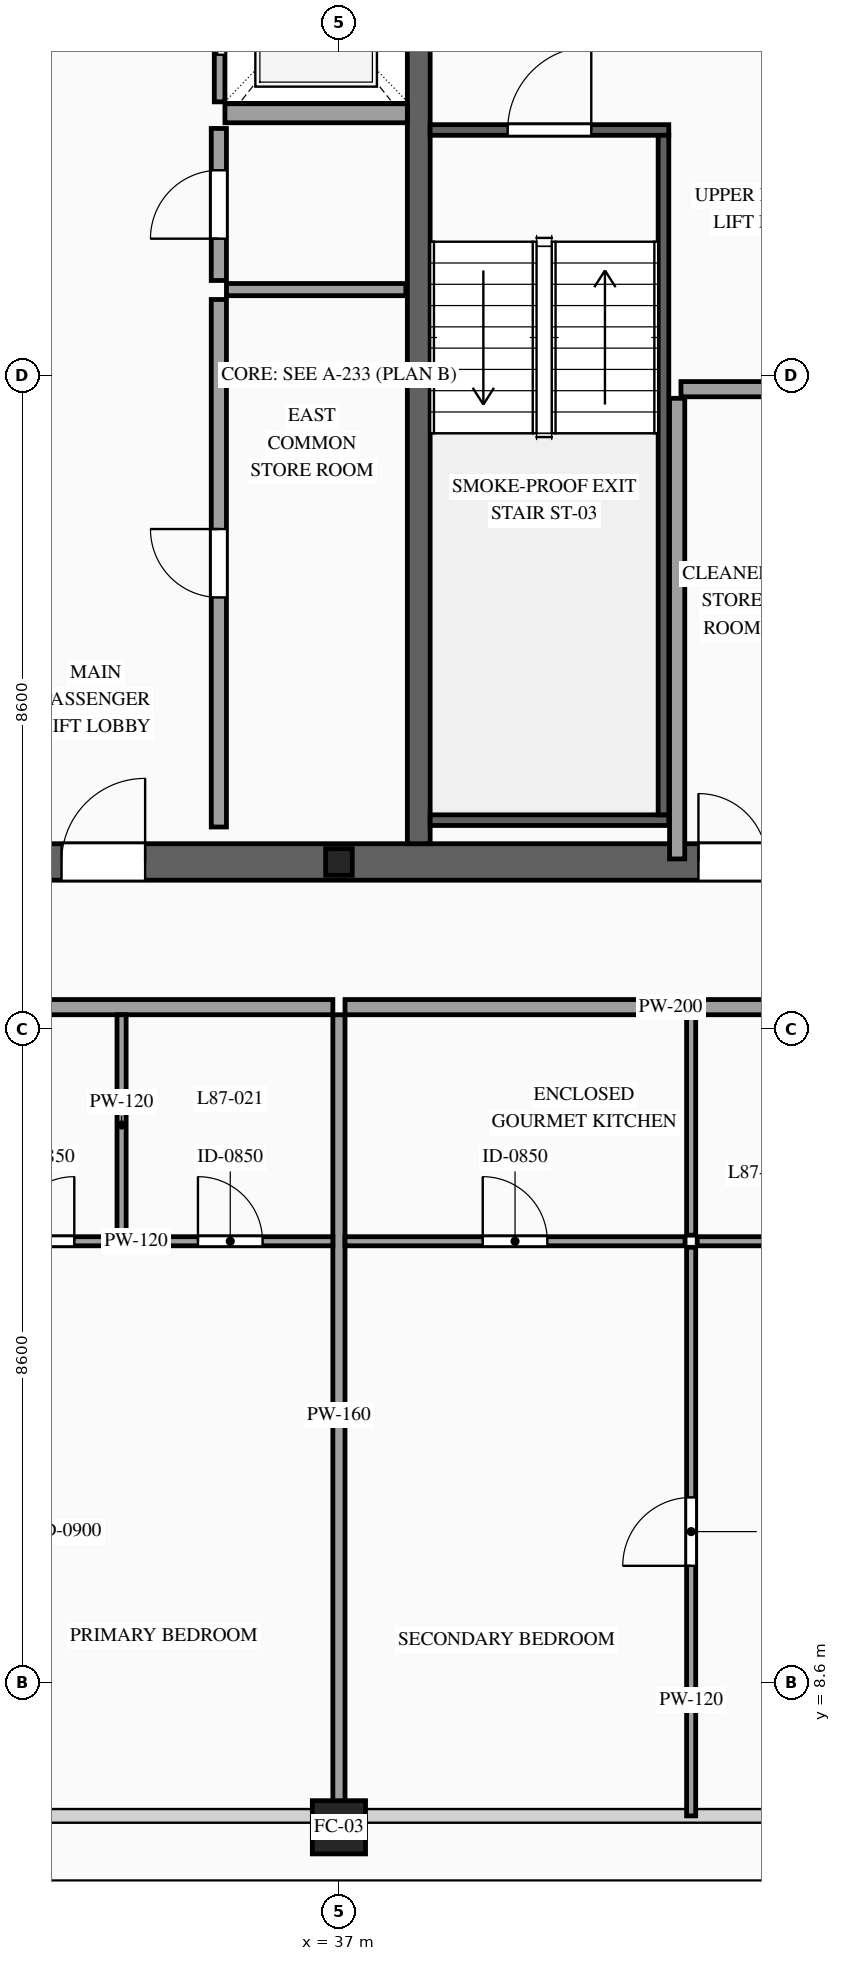
"""IFC4 building model, lengths in metres.
Left out: names, types, materials, properties, quantities, classifications, styles, units other than length and angle.
Written with IfcOpenShell. Run it as: python <this file> out.ifc"""

import sys

from ifc_helpers import new_model, si_unit, direction, frame, frame_2d, origin, origin_2d, place, context, subcontext, project, spatial, rectangle, hollow_rectangle, i_section, extrude, source, transform, mapped, element, fill, save


model = new_model("IFC4")
c1 = context("Model", 3, precision=1e-05, world=origin(), true_north=direction((0.0, 1.0)))
c2 = subcontext(c1, "Body", "Model", "MODEL_VIEW")
j1 = project(units=[si_unit("LENGTHUNIT", "METRE"), si_unit("PLANEANGLEUNIT", "RADIAN")], contexts=[c1])
p1 = place(None, origin())
s1 = spatial("IfcSite", under=j1, at=p1, CompositionType="ELEMENT")
p2 = place(p1, origin())
s2 = spatial("IfcBuilding", under=s1, at=p2, CompositionType="ELEMENT")
p3 = place(p2, frame((0.0, 0.0, 325.2)))
s3 = spatial("IfcBuildingStorey", under=s2, at=p3, CompositionType="ELEMENT", Elevation=325.2)
p4 = place(p3, frame((23.56, 19.4, 0.0), z_axis=(0.0, 0.0, 1.0), x_axis=(1.0, 0.0, 0.0)))
e1 = element("IfcWall", 1, at=p4, inside=s3, PredefinedType="SHEAR", context=c2, shape_type="SweptSolid", body=[
    extrude(rectangle(XDim=26.88, YDim=0.48, at=frame_2d((13.44, 0.0))), origin(), (0.0, 0.0, 1.0), 3.5),
])
p5 = place(p4, frame((1.89, 0.0, 0.0)))
e2 = element("IfcOpeningElement", 2, at=p5, cuts=e1, PredefinedType="OPENING", context=c2, shape_type="SweptSolid", body=[
    extrude(rectangle(XDim=1.1, YDim=2.2, at=frame_2d((0.55, 1.1))), frame((0.0, 0.255, 0.0), z_axis=(0.0, -1.0, 0.0), x_axis=(1.0, 0.0, 0.0)), (0.0, 0.0, 1.0), 0.51),
])
p6 = place(p4, frame((9.79, 0.0, 0.0)))
e3 = element("IfcOpeningElement", 3, at=p6, cuts=e1, PredefinedType="OPENING", context=c2, shape_type="SweptSolid", body=[
    extrude(rectangle(XDim=1.1, YDim=2.2, at=frame_2d((0.55, 1.1))), frame((0.0, 0.255, 0.0), z_axis=(0.0, -1.0, 0.0), x_axis=(1.0, 0.0, 0.0)), (0.0, 0.0, 1.0), 0.51),
])
p7 = place(p4, frame((22.99, 0.0, 0.0)))
e4 = element("IfcOpeningElement", 4, at=p7, cuts=e1, PredefinedType="OPENING", context=c2, shape_type="SweptSolid", body=[
    extrude(rectangle(XDim=1.1, YDim=2.2, at=frame_2d((0.55, 1.1))), frame((0.0, 0.255, 0.0), z_axis=(0.0, -1.0, 0.0), x_axis=(1.0, 0.0, 0.0)), (0.0, 0.0, 1.0), 0.51),
])
p8 = place(p4, frame((19.61, 0.0, 0.0)))
e5 = element("IfcOpeningElement", 5, at=p8, cuts=e1, PredefinedType="OPENING", context=c2, shape_type="SweptSolid", body=[
    extrude(rectangle(XDim=0.9, YDim=2.15, at=frame_2d((0.45, 1.075))), frame((0.0, 0.255, 0.0), z_axis=(0.0, -1.0, 0.0), x_axis=(1.0, 0.0, 0.0)), (0.0, 0.0, 1.0), 0.51),
])
p9 = place(p4, frame((18.17, 0.0, 0.0)))
e6 = element("IfcOpeningElement", 6, at=p9, cuts=e1, PredefinedType="OPENING", context=c2, shape_type="SweptSolid", body=[
    extrude(rectangle(XDim=0.9, YDim=2.15, at=frame_2d((0.45, 1.075))), frame((0.0, 0.255, 0.0), z_axis=(0.0, -1.0, 0.0), x_axis=(1.0, 0.0, 0.0)), (0.0, 0.0, 1.0), 0.51),
])
m1 = source(origin(), c2, "Body", "SweptSolid", [
    extrude(rectangle(XDim=12.32, YDim=0.3, at=frame_2d((6.16, 0.0))), origin(), (0.0, 0.0, 1.0), 3.5),
])
p10 = place(p3, frame((38.05, 19.64, 0.0), z_axis=(0.0, 0.0, 1.0), x_axis=(0.0, 1.0, 0.0)))
e7 = element("IfcWall", 7, at=p10, inside=s3, PredefinedType="SOLIDWALL", context=c2, shape_type="MappedRepresentation", body=[
    mapped(m1, transform((0.0, 0.0, 0.0), scale=1.0)),
])
m2 = source(origin(), c2, "Body", "SweptSolid", [
    extrude(i_section(OverallWidth=0.35, OverallDepth=0.35, WebThickness=0.012, FlangeThickness=0.019, at=origin_2d()), origin(), (0.0, 0.0, 1.0), 3.5),
])
p11 = place(p3, frame((37.0, 19.4, 0.0), z_axis=(0.0, 0.0, 1.0), x_axis=(1.0, 0.0, 0.0)))
e8 = element("IfcColumn", 8, at=p11, inside=s3, PredefinedType="COLUMN", context=c2, shape_type="MappedRepresentation", body=[
    mapped(m2, transform((0.0, 0.0, 0.0), scale=1.0)),
])
m3 = source(origin(), c2, "Body", "SweptSolid", [
    extrude(hollow_rectangle(XDim=0.7, YDim=0.7, WallThickness=0.032, at=origin_2d()), origin(), (0.0, 0.0, 1.0), 3.5),
])
p12 = place(p3, frame((37.0, 6.7, 0.0), z_axis=(0.0, 0.0, 1.0), x_axis=(1.0, 0.0, 0.0)))
e9 = element("IfcColumn", 9, at=p12, inside=s3, PredefinedType="COLUMN", context=c2, shape_type="MappedRepresentation", body=[
    mapped(m3, transform((0.0, 0.0, 0.0), scale=1.0)),
])
p13 = place(p3, frame((35.43, 29.4, 0.0), z_axis=(0.0, 0.0, 1.0), x_axis=(0.0, 1.0, 0.0)))
e10 = element("IfcWall", 10, at=p13, inside=s3, PredefinedType="SOLIDWALL", context=c2, shape_type="SweptSolid", body=[
    extrude(rectangle(XDim=2.34, YDim=0.14, at=frame_2d((1.17, 0.0))), origin(), (0.0, 0.0, 1.0), 3.28),
])
p14 = place(p13, frame((0.62, 0.0, 0.0)))
e11 = element("IfcOpeningElement", 11, at=p14, cuts=e10, PredefinedType="OPENING", context=c2, shape_type="SweptSolid", body=[
    extrude(rectangle(XDim=1.1, YDim=2.2, at=frame_2d((0.55, 1.1))), frame((0.0, 0.085, 0.0), z_axis=(0.0, -1.0, 0.0), x_axis=(1.0, 0.0, 0.0)), (0.0, 0.0, 1.0), 0.17),
])
m4 = source(origin(), c2, "Body", "SweptSolid", [
    extrude(rectangle(XDim=2.4, YDim=0.25, at=frame_2d((1.2, 0.0))), origin(), (0.0, 0.0, 1.0), 3.28),
])
p15 = place(p3, frame((35.5, 29.25, 0.0), z_axis=(0.0, 0.0, 1.0), x_axis=(1.0, 0.0, 0.0)))
e12 = element("IfcWall", 12, at=p15, inside=s3, PredefinedType="SOLIDWALL", context=c2, shape_type="MappedRepresentation", body=[
    mapped(m4, transform((0.0, 0.0, 0.0), scale=1.0)),
])
p16 = place(p3, frame((38.2, 29.03, 0.0), z_axis=(0.0, 0.0, 1.0), x_axis=(1.0, 0.0, 0.0)))
e13 = element("IfcWall", 13, at=p16, inside=s3, PredefinedType="SOLIDWALL", context=c2, shape_type="SweptSolid", body=[
    extrude(rectangle(XDim=3.14, YDim=0.14, at=frame_2d((1.57, 0.0))), origin(), (0.0, 0.0, 1.0), 3.28),
])
p17 = place(p16, frame((1.02, 0.0, 0.0)))
e14 = element("IfcOpeningElement", 14, at=p17, cuts=e13, PredefinedType="OPENING", context=c2, shape_type="SweptSolid", body=[
    extrude(rectangle(XDim=1.1, YDim=2.2, at=frame_2d((0.55, 1.1))), frame((0.0, 0.085, 0.0), z_axis=(0.0, -1.0, 0.0), x_axis=(1.0, 0.0, 0.0)), (0.0, 0.0, 1.0), 0.17),
])
m5 = source(origin(), c2, "Body", "SweptSolid", [
    extrude(rectangle(XDim=3.14, YDim=0.14, at=frame_2d((1.57, 0.0))), origin(), (0.0, 0.0, 1.0), 3.28),
])
p18 = place(p3, frame((38.2, 19.95, 0.0), z_axis=(0.0, 0.0, 1.0), x_axis=(1.0, 0.0, 0.0)))
e15 = element("IfcWall", 15, at=p18, inside=s3, PredefinedType="SOLIDWALL", context=c2, shape_type="MappedRepresentation", body=[
    mapped(m5, transform((0.0, 0.0, 0.0), scale=1.0)),
])
m6 = source(origin(), c2, "Body", "SweptSolid", [
    extrude(rectangle(XDim=8.94, YDim=0.14, at=frame_2d((4.47, 0.0))), origin(), (0.0, 0.0, 1.0), 3.28),
])
p19 = place(p3, frame((41.27, 20.02, 0.0), z_axis=(0.0, 0.0, 1.0), x_axis=(0.0, 1.0, 0.0)))
e16 = element("IfcWall", 16, at=p19, inside=s3, PredefinedType="SOLIDWALL", context=c2, shape_type="MappedRepresentation", body=[
    mapped(m6, transform((0.0, 0.0, 0.0), scale=1.0)),
])
p20 = place(p3, frame((35.42, 19.86, 0.0), z_axis=(0.0, 0.0, 1.0), x_axis=(0.0, 1.0, 0.0)))
e17 = element("IfcWall", 17, at=p20, inside=s3, PredefinedType="PARTITIONING", context=c2, shape_type="SweptSolid", body=[
    extrude(rectangle(XDim=6.94, YDim=0.2, at=frame_2d((3.47, 0.0))), origin(), (0.0, 0.0, 1.0), 3.28),
])
p21 = place(p20, frame((3.02, 0.0, 0.0)))
e18 = element("IfcOpeningElement", 18, at=p21, cuts=e17, PredefinedType="OPENING", context=c2, shape_type="SweptSolid", body=[
    extrude(rectangle(XDim=0.9, YDim=2.15, at=frame_2d((0.45, 1.075))), frame((0.0, 0.115, 0.0), z_axis=(0.0, -1.0, 0.0), x_axis=(1.0, 0.0, 0.0)), (0.0, 0.0, 1.0), 0.23),
])
p22 = place(p3, frame((35.42, 27.05, 0.0), z_axis=(0.0, 0.0, 1.0), x_axis=(0.0, 1.0, 0.0)))
e19 = element("IfcWall", 19, at=p22, inside=s3, PredefinedType="PARTITIONING", context=c2, shape_type="SweptSolid", body=[
    extrude(rectangle(XDim=2.0, YDim=0.2, at=frame_2d((1.0, 0.0))), origin(), (0.0, 0.0, 1.0), 3.28),
])
p23 = place(p22, frame((0.55, 0.0, 0.0)))
e20 = element("IfcOpeningElement", 20, at=p23, cuts=e19, PredefinedType="OPENING", context=c2, shape_type="SweptSolid", body=[
    extrude(rectangle(XDim=0.9, YDim=2.15, at=frame_2d((0.45, 1.075))), frame((0.0, 0.115, 0.0), z_axis=(0.0, -1.0, 0.0), x_axis=(1.0, 0.0, 0.0)), (0.0, 0.0, 1.0), 0.23),
])
m7 = source(origin(), c2, "Body", "SweptSolid", [
    extrude(rectangle(XDim=2.36, YDim=0.16, at=frame_2d((1.18, 0.0))), origin(), (0.0, 0.0, 1.0), 3.28),
])
p24 = place(p3, frame((35.52, 26.93, 0.0), z_axis=(0.0, 0.0, 1.0), x_axis=(1.0, 0.0, 0.0)))
e21 = element("IfcWall", 21, at=p24, inside=s3, PredefinedType="PARTITIONING", context=c2, shape_type="MappedRepresentation", body=[
    mapped(m7, transform((0.0, 0.0, 0.0), scale=1.0)),
])
m8 = source(origin(), c2, "Body", "SweptSolid", [
    extrude(rectangle(XDim=6.06, YDim=0.2, at=frame_2d((3.03, 0.0))), origin(), (0.0, 0.0, 1.0), 3.28),
])
p25 = place(p3, frame((41.45, 19.44, 0.0), z_axis=(0.0, 0.0, 1.0), x_axis=(0.0, 1.0, 0.0)))
e22 = element("IfcWall", 22, at=p25, inside=s3, PredefinedType="PARTITIONING", context=c2, shape_type="MappedRepresentation", body=[
    mapped(m8, transform((0.0, 0.0, 0.0), scale=1.0)),
])
m9 = source(origin(), c2, "Body", "SweptSolid", [
    extrude(rectangle(XDim=1.35, YDim=0.2, at=frame_2d((0.675, 0.0))), origin(), (0.0, 0.0, 1.0), 3.28),
])
p26 = place(p3, frame((41.5, 25.62, 0.0), z_axis=(0.0, 0.0, 1.0), x_axis=(1.0, 0.0, 0.0)))
e23 = element("IfcWall", 23, at=p26, inside=s3, PredefinedType="PARTITIONING", context=c2, shape_type="MappedRepresentation", body=[
    mapped(m9, transform((0.0, 0.0, 0.0), scale=1.0)),
])
p27 = place(p3, frame((20.94, 17.49, 0.0), z_axis=(0.0, 0.0, 1.0), x_axis=(1.0, 0.0, 0.0)))
e24 = element("IfcWall", 24, at=p27, inside=s3, PredefinedType="PARTITIONING", context=c2, shape_type="SweptSolid", body=[
    extrude(rectangle(XDim=15.98, YDim=0.2, at=frame_2d((7.99, 0.0))), origin(), (0.0, 0.0, 1.0), 3.28),
])
p28 = place(p27, frame((8.816, 0.0, 0.0)))
e25 = element("IfcOpeningElement", 25, at=p28, cuts=e24, PredefinedType="OPENING", context=c2, shape_type="SweptSolid", body=[
    extrude(rectangle(XDim=1.0, YDim=2.2, at=frame_2d((0.5, 1.1))), frame((0.0, 0.115, 0.0), z_axis=(0.0, -1.0, 0.0), x_axis=(1.0, 0.0, 0.0)), (0.0, 0.0, 1.0), 0.23),
])
m10 = source(origin(), c2, "Body", "SweptSolid", [
    extrude(rectangle(XDim=10.54, YDim=0.16, at=frame_2d((5.27, 0.0))), origin(), (0.0, 0.0, 1.0), 2.787),
])
p29 = place(p3, frame((37.0, 6.85, 0.0), z_axis=(0.0, 0.0, 1.0), x_axis=(0.0, 1.0, 0.0)))
e26 = element("IfcWall", 26, at=p29, inside=s3, PredefinedType="PARTITIONING", context=c2, shape_type="MappedRepresentation", body=[
    mapped(m10, transform((0.0, 0.0, 0.0), scale=1.0)),
])
m11 = source(origin(), c2, "Body", "SweptSolid", [
    extrude(rectangle(XDim=2.9, YDim=0.12, at=frame_2d((1.45, 0.0))), origin(), (0.0, 0.0, 1.0), 3.28),
])
p30 = place(p3, frame((34.14, 14.49, 0.0), z_axis=(0.0, 0.0, 1.0), x_axis=(0.0, 1.0, 0.0)))
e27 = element("IfcWall", 27, at=p30, inside=s3, PredefinedType="PARTITIONING", context=c2, shape_type="MappedRepresentation", body=[
    mapped(m11, transform((0.0, 0.0, 0.0), scale=1.0)),
])
p31 = place(p3, frame((32.126, 14.41, 0.0), z_axis=(0.0, 0.0, 1.0), x_axis=(1.0, 0.0, 0.0)))
e28 = element("IfcWall", 28, at=p31, inside=s3, PredefinedType="PARTITIONING", context=c2, shape_type="SweptSolid", body=[
    extrude(rectangle(XDim=4.794, YDim=0.12, at=frame_2d((2.397, 0.0))), origin(), (0.0, 0.0, 1.0), 3.28),
])
p32 = place(p31, frame((3.019, 0.0, 0.0)))
e29 = element("IfcOpeningElement", 29, at=p32, cuts=e28, PredefinedType="OPENING", context=c2, shape_type="SweptSolid", body=[
    extrude(rectangle(XDim=0.85, YDim=2.1, at=frame_2d((0.425, 1.05))), frame((0.0, 0.075, 0.0), z_axis=(0.0, -1.0, 0.0), x_axis=(1.0, 0.0, 0.0)), (0.0, 0.0, 1.0), 0.15),
])
p33 = place(p31, frame((0.542, 0.0, 0.0)))
e30 = element("IfcOpeningElement", 30, at=p33, cuts=e28, PredefinedType="OPENING", context=c2, shape_type="SweptSolid", body=[
    extrude(rectangle(XDim=0.85, YDim=2.1, at=frame_2d((0.425, 1.05))), frame((0.0, 0.075, 0.0), z_axis=(0.0, -1.0, 0.0), x_axis=(1.0, 0.0, 0.0)), (0.0, 0.0, 1.0), 0.15),
])
p34 = place(p3, frame((37.08, 17.49, 0.0), z_axis=(0.0, 0.0, 1.0), x_axis=(1.0, 0.0, 0.0)))
e31 = element("IfcWall", 31, at=p34, inside=s3, PredefinedType="PARTITIONING", context=c2, shape_type="SweptSolid", body=[
    extrude(rectangle(XDim=15.98, YDim=0.2, at=frame_2d((7.99, 0.0))), origin(), (0.0, 0.0, 1.0), 3.28),
])
p35 = place(p34, frame((8.816, 0.0, 0.0)))
e32 = element("IfcOpeningElement", 32, at=p35, cuts=e31, PredefinedType="OPENING", context=c2, shape_type="SweptSolid", body=[
    extrude(rectangle(XDim=1.0, YDim=2.2, at=frame_2d((0.5, 1.1))), frame((0.0, 0.115, 0.0), z_axis=(0.0, -1.0, 0.0), x_axis=(1.0, 0.0, 0.0)), (0.0, 0.0, 1.0), 0.23),
])
p36 = place(p3, frame((37.08, 14.41, 0.0), z_axis=(0.0, 0.0, 1.0), x_axis=(1.0, 0.0, 0.0)))
e33 = element("IfcWall", 33, at=p36, inside=s3, PredefinedType="PARTITIONING", context=c2, shape_type="SweptSolid", body=[
    extrude(rectangle(XDim=4.474, YDim=0.12, at=frame_2d((2.237, 0.0))), origin(), (0.0, 0.0, 1.0), 3.28),
])
p37 = place(p36, frame((1.812, 0.0, 0.0)))
e34 = element("IfcOpeningElement", 34, at=p37, cuts=e33, PredefinedType="OPENING", context=c2, shape_type="SweptSolid", body=[
    extrude(rectangle(XDim=0.85, YDim=2.1, at=frame_2d((0.425, 1.05))), frame((0.0, 0.075, 0.0), z_axis=(0.0, -1.0, 0.0), x_axis=(1.0, 0.0, 0.0)), (0.0, 0.0, 1.0), 0.15),
])
p38 = place(p3, frame((41.634, 14.49, 0.0), z_axis=(0.0, 0.0, 1.0), x_axis=(0.0, 1.0, 0.0)))
e35 = element("IfcWall", 35, at=p38, inside=s3, PredefinedType="PARTITIONING", context=c2, shape_type="MappedRepresentation", body=[
    mapped(m11, transform((0.0, 0.0, 0.0), scale=1.0)),
])
p39 = place(p3, frame((41.634, 6.85, 0.0), z_axis=(0.0, 0.0, 1.0), x_axis=(0.0, 1.0, 0.0)))
e36 = element("IfcWall", 36, at=p39, inside=s3, PredefinedType="PARTITIONING", context=c2, shape_type="SweptSolid", body=[
    extrude(rectangle(XDim=7.48, YDim=0.12, at=frame_2d((3.74, 0.0))), origin(), (0.0, 0.0, 1.0), 3.28),
])
p40 = place(p39, frame((3.29, 0.0, 0.0)))
e37 = element("IfcOpeningElement", 37, at=p40, cuts=e36, PredefinedType="OPENING", context=c2, shape_type="SweptSolid", body=[
    extrude(rectangle(XDim=0.9, YDim=2.15, at=frame_2d((0.45, 1.075))), frame((0.0, 0.075, 0.0), z_axis=(0.0, -1.0, 0.0), x_axis=(1.0, 0.0, 0.0)), (0.0, 0.0, 1.0), 0.15),
])
m12 = source(origin(), c2, "Body", "SweptSolid", [
    extrude(rectangle(XDim=2.812, YDim=0.12, at=frame_2d((1.406, 0.0))), origin(), (0.0, 0.0, 1.0), 3.28),
])
p41 = place(p3, frame((41.714, 14.41, 0.0), z_axis=(0.0, 0.0, 1.0), x_axis=(1.0, 0.0, 0.0)))
e38 = element("IfcWall", 38, at=p41, inside=s3, PredefinedType="PARTITIONING", context=c2, shape_type="MappedRepresentation", body=[
    mapped(m12, transform((0.0, 0.0, 0.0), scale=1.0)),
])
m13 = source(origin(), c2, "Body", "SweptSolid", [
    extrude(rectangle(XDim=1.1, YDim=2.2, at=frame_2d((0.55, 1.1))), frame((0.0, 0.025, 0.0), z_axis=(0.0, -1.0, 0.0), x_axis=(1.0, 0.0, 0.0)), (0.0, 0.0, 1.0), 0.05),
])
p42 = place(p14, origin())
e39 = element("IfcDoor", 39, at=p42, inside=s3, OperationType="SLIDING_TO_RIGHT", PredefinedType="DOOR", context=c2, shape_type="MappedRepresentation", body=[
    mapped(m13, transform((0.0, 0.0, 0.0), scale=1.0)),
])
fill(e11, e39)
m14 = source(origin(), c2, "Body", "SweptSolid", [
    extrude(rectangle(XDim=1.1, YDim=2.2, at=frame_2d((0.55, 1.1))), frame((0.0, 0.025, 0.0), z_axis=(0.0, -1.0, 0.0), x_axis=(1.0, 0.0, 0.0)), (0.0, 0.0, 1.0), 0.05),
])
p43 = place(p17, origin())
e40 = element("IfcDoor", 40, at=p43, inside=s3, OperationType="SINGLE_SWING_RIGHT", PredefinedType="DOOR", context=c2, shape_type="MappedRepresentation", body=[
    mapped(m14, transform((0.0, 0.0, 0.0), scale=1.0)),
])
fill(e14, e40)
p44 = place(p6, origin())
e41 = element("IfcDoor", 41, at=p44, inside=s3, OperationType="SINGLE_SWING_RIGHT", PredefinedType="DOOR", context=c2, shape_type="MappedRepresentation", body=[
    mapped(m14, transform((0.0, 0.0, 0.0), scale=1.0)),
])
fill(e3, e41)
m15 = source(origin(), c2, "Body", "SweptSolid", [
    extrude(rectangle(XDim=0.9, YDim=2.15, at=frame_2d((0.45, 1.075))), frame((0.0, 0.025, 0.0), z_axis=(0.0, -1.0, 0.0), x_axis=(1.0, 0.0, 0.0)), (0.0, 0.0, 1.0), 0.05),
])
p45 = place(p21, origin())
e42 = element("IfcDoor", 42, at=p45, inside=s3, OperationType="SINGLE_SWING_RIGHT", PredefinedType="DOOR", context=c2, shape_type="MappedRepresentation", body=[
    mapped(m15, transform((0.0, 0.0, 0.0), scale=1.0)),
])
fill(e18, e42)
p46 = place(p23, origin())
e43 = element("IfcDoor", 43, at=p46, inside=s3, OperationType="SINGLE_SWING_LEFT", PredefinedType="DOOR", context=c2, shape_type="MappedRepresentation", body=[
    mapped(m15, transform((0.0, 0.0, 0.0), scale=1.0)),
])
fill(e20, e43)
p47 = place(p9, origin())
e44 = element("IfcDoor", 44, at=p47, inside=s3, OperationType="SINGLE_SWING_LEFT", PredefinedType="DOOR", context=c2, shape_type="MappedRepresentation", body=[
    mapped(m15, transform((0.0, 0.0, 0.0), scale=1.0)),
])
fill(e6, e44)
m16 = source(origin(), c2, "Body", "SweptSolid", [
    extrude(rectangle(XDim=0.85, YDim=2.1, at=frame_2d((0.425, 1.05))), frame((0.0, 0.025, 0.0), z_axis=(0.0, -1.0, 0.0), x_axis=(1.0, 0.0, 0.0)), (0.0, 0.0, 1.0), 0.05),
])
p48 = place(p32, origin())
e45 = element("IfcDoor", 45, at=p48, inside=s3, OperationType="SINGLE_SWING_LEFT", PredefinedType="DOOR", context=c2, shape_type="MappedRepresentation", body=[
    mapped(m16, transform((0.0, 0.0, 0.0), scale=1.0)),
])
fill(e29, e45)
p49 = place(p33, origin())
e46 = element("IfcDoor", 46, at=p49, inside=s3, OperationType="SINGLE_SWING_RIGHT", PredefinedType="DOOR", context=c2, shape_type="MappedRepresentation", body=[
    mapped(m16, transform((0.0, 0.0, 0.0), scale=1.0)),
])
fill(e30, e46)
p50 = place(p37, origin())
e47 = element("IfcDoor", 47, at=p50, inside=s3, OperationType="SINGLE_SWING_LEFT", PredefinedType="DOOR", context=c2, shape_type="MappedRepresentation", body=[
    mapped(m16, transform((0.0, 0.0, 0.0), scale=1.0)),
])
fill(e34, e47)
m17 = source(origin(), c2, "Body", "SweptSolid", [
    extrude(rectangle(XDim=0.9, YDim=2.15, at=frame_2d((0.45, 1.075))), frame((0.0, 0.025, 0.0), z_axis=(0.0, -1.0, 0.0), x_axis=(1.0, 0.0, 0.0)), (0.0, 0.0, 1.0), 0.05),
])
p51 = place(p40, origin())
e48 = element("IfcDoor", 48, at=p51, inside=s3, OperationType="SINGLE_SWING_LEFT", PredefinedType="DOOR", context=c2, shape_type="MappedRepresentation", body=[
    mapped(m17, transform((0.0, 0.0, 0.0), scale=1.0)),
])
fill(e37, e48)
save(model, sys.argv[1])
